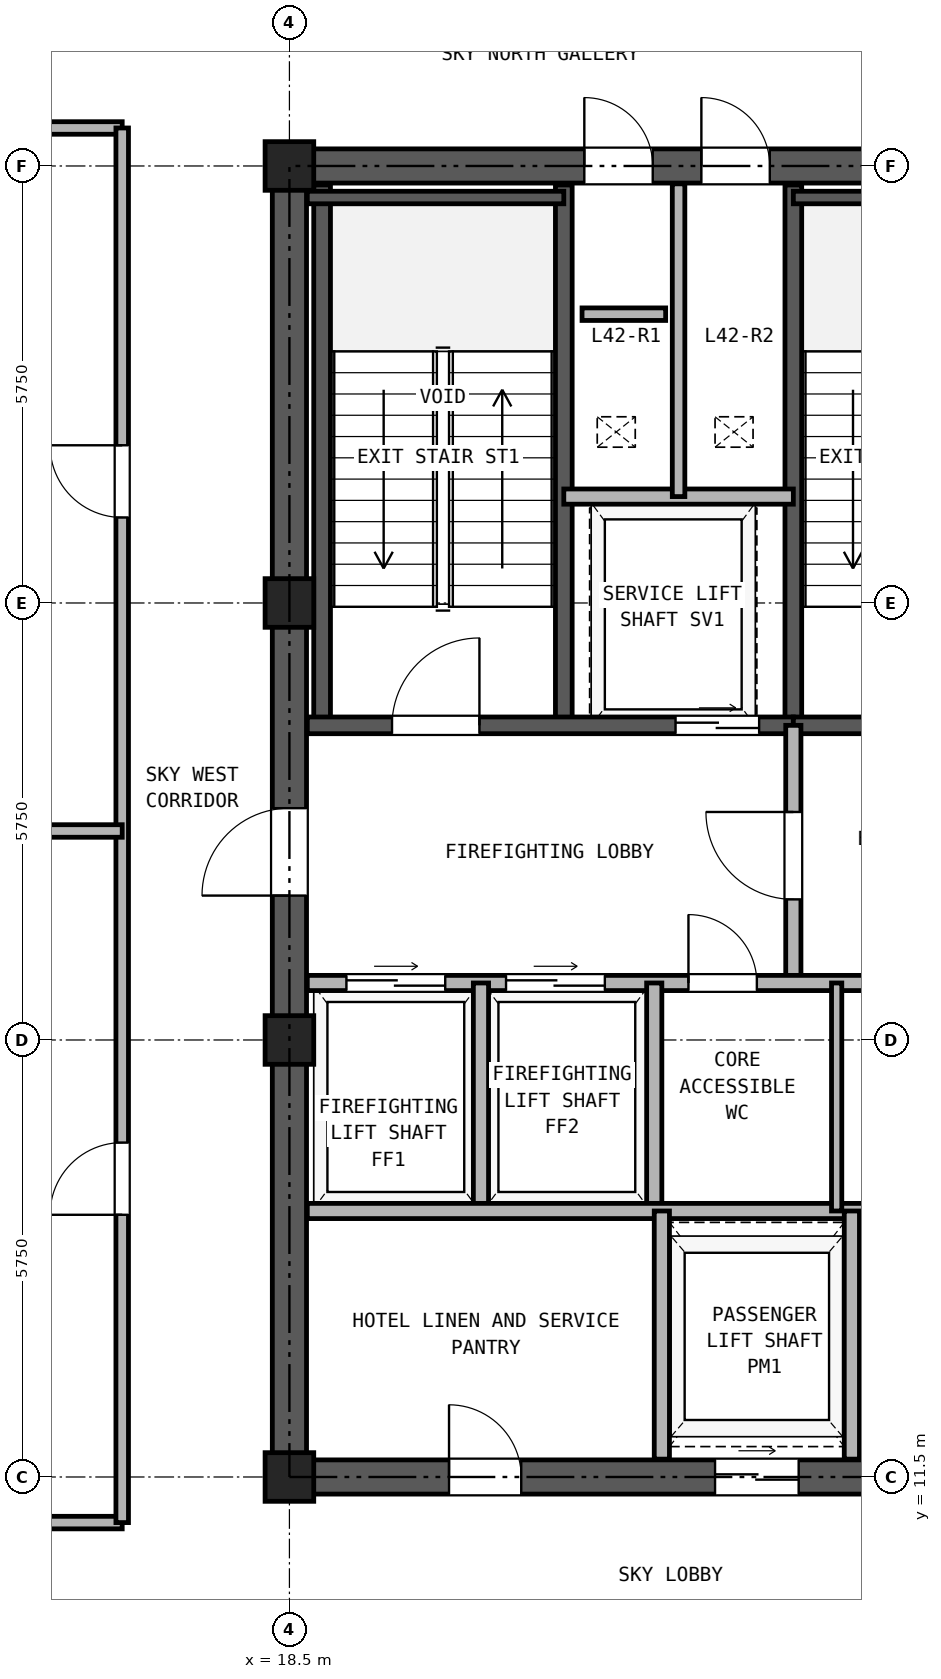
"""IFC4 building model, lengths in metres.
Left out: names, types, materials, properties, quantities, classifications, styles, units other than length and angle.
Written with IfcOpenShell. Run it as: python <this file> out.ifc"""

import sys

from ifc_helpers import new_model, si_unit, direction, frame, frame_2d, origin, origin_2d, place, context, subcontext, project, spatial, rectangle, hollow_rectangle, extrude, source, transform, mapped, element, fill, save


model = new_model("IFC4")
c1 = context("Model", 3, precision=1e-05, world=origin(), true_north=direction((0.0, 1.0)))
c2 = subcontext(c1, "Body", "Model", "MODEL_VIEW")
j1 = project(units=[si_unit("LENGTHUNIT", "METRE"), si_unit("PLANEANGLEUNIT", "RADIAN")], contexts=[c1])
p1 = place(None, origin())
s1 = spatial("IfcSite", under=j1, at=p1, CompositionType="ELEMENT")
p2 = place(p1, origin())
s2 = spatial("IfcBuilding", under=s1, at=p2, CompositionType="ELEMENT")
p3 = place(p2, frame((0.0, 0.0, 151.6)))
s3 = spatial("IfcBuildingStorey", under=s2, at=p3, CompositionType="ELEMENT", Elevation=151.6)
m1 = source(origin(), c2, "Body", "SweptSolid", [
    extrude(hollow_rectangle(XDim=0.64, YDim=0.64, WallThickness=0.035, at=origin_2d()), origin(), (0.0, 0.0, 1.0), 4.25),
])
for number, where, z_axis, x_axis in (
    (1, (18.5, 11.5, 0.0), (0.0, 0.0, 1.0), (1.0, 0.0, 0.0)),
    (2, (18.5, 17.25, 0.0), (0.0, 0.0, 1.0), (1.0, 0.0, 0.0)),
    (3, (18.5, 23.0, 0.0), (0.0, 0.0, 1.0), (1.0, 0.0, 0.0)),
    (4, (18.5, 28.75, 0.0), (0.0, 0.0, 1.0), (1.0, 0.0, 0.0)),
):
    element("IfcColumn", number, at=place(p3, frame(where, z_axis=z_axis, x_axis=x_axis)), inside=s3, PredefinedType="COLUMN", context=c2, shape_type="MappedRepresentation", body=[
        mapped(m1, transform((0.0, 0.0, 0.0), x_axis=(1.0, 0.0, 0.0), y_axis=(0.0, 1.0, 0.0), z_axis=(0.0, 0.0, 1.0), scale=1.0)),
    ])
p4 = place(p3, frame((18.275, 11.5, 0.0), z_axis=(0.0, 0.0, 1.0), x_axis=(1.0, 0.0, 0.0)))
e5 = element("IfcWall", 5, at=p4, inside=s3, PredefinedType="SHEAR", context=c2, shape_type="SweptSolid", body=[
    extrude(rectangle(XDim=10.45, YDim=0.45, at=frame_2d((5.225, 0.0))), origin(), (0.0, 0.0, 1.0), 4.25),
])
p5 = place(p4, frame((2.325, 0.0, 0.0)))
e6 = element("IfcOpeningElement", 6, at=p5, cuts=e5, PredefinedType="OPENING", context=c2, shape_type="SweptSolid", body=[
    extrude(rectangle(XDim=0.95, YDim=2.15, at=frame_2d((0.475, 1.075))), frame((0.0, 0.235, 0.0), z_axis=(0.0, -1.0, 0.0), x_axis=(1.0, 0.0, 0.0)), (0.0, 0.0, 1.0), 0.47),
])
p6 = place(p4, frame((5.825, 0.0, 0.0)))
e7 = element("IfcOpeningElement", 7, at=p6, cuts=e5, PredefinedType="OPENING", context=c2, shape_type="SweptSolid", body=[
    extrude(rectangle(XDim=1.1, YDim=2.25, at=frame_2d((0.55, 1.125))), frame((0.0, 0.235, 0.0), z_axis=(0.0, -1.0, 0.0), x_axis=(1.0, 0.0, 0.0)), (0.0, 0.0, 1.0), 0.47),
])
p7 = place(p4, frame((8.225, 0.0, 0.0)))
e8 = element("IfcOpeningElement", 8, at=p7, cuts=e5, PredefinedType="OPENING", context=c2, shape_type="SweptSolid", body=[
    extrude(rectangle(XDim=1.1, YDim=2.25, at=frame_2d((0.55, 1.125))), frame((0.0, 0.235, 0.0), z_axis=(0.0, -1.0, 0.0), x_axis=(1.0, 0.0, 0.0)), (0.0, 0.0, 1.0), 0.47),
])
p8 = place(p3, frame((18.275, 28.75, 0.0), z_axis=(0.0, 0.0, 1.0), x_axis=(1.0, 0.0, 0.0)))
e9 = element("IfcWall", 9, at=p8, inside=s3, PredefinedType="SHEAR", context=c2, shape_type="SweptSolid", body=[
    extrude(rectangle(XDim=10.45, YDim=0.45, at=frame_2d((5.225, 0.0))), origin(), (0.0, 0.0, 1.0), 4.25),
])
p9 = place(p8, frame((4.105, 0.0, 0.0)))
e10 = element("IfcOpeningElement", 10, at=p9, cuts=e9, PredefinedType="OPENING", context=c2, shape_type="SweptSolid", body=[
    extrude(rectangle(XDim=0.9, YDim=2.05, at=frame_2d((0.45, 1.025))), frame((0.0, 0.235, 0.0), z_axis=(0.0, -1.0, 0.0), x_axis=(1.0, 0.0, 0.0)), (0.0, 0.0, 1.0), 0.47),
])
p10 = place(p8, frame((5.645, 0.0, 0.0)))
e11 = element("IfcOpeningElement", 11, at=p10, cuts=e9, PredefinedType="OPENING", context=c2, shape_type="SweptSolid", body=[
    extrude(rectangle(XDim=0.9, YDim=2.05, at=frame_2d((0.45, 1.025))), frame((0.0, 0.235, 0.0), z_axis=(0.0, -1.0, 0.0), x_axis=(1.0, 0.0, 0.0)), (0.0, 0.0, 1.0), 0.47),
])
p11 = place(p3, frame((18.5, 11.725, 0.0), z_axis=(0.0, 0.0, 1.0), x_axis=(0.0, 1.0, 0.0)))
e12 = element("IfcWall", 12, at=p11, inside=s3, PredefinedType="SHEAR", context=c2, shape_type="SweptSolid", body=[
    extrude(rectangle(XDim=16.8, YDim=0.45, at=frame_2d((8.4, 0.0))), origin(), (0.0, 0.0, 1.0), 4.25),
])
p12 = place(p11, frame((7.425, 0.0, 0.0)))
e13 = element("IfcOpeningElement", 13, at=p12, cuts=e12, PredefinedType="OPENING", context=c2, shape_type="SweptSolid", body=[
    extrude(rectangle(XDim=1.15, YDim=2.2, at=frame_2d((0.575, 1.1))), frame((0.0, 0.235, 0.0), z_axis=(0.0, -1.0, 0.0), x_axis=(1.0, 0.0, 0.0)), (0.0, 0.0, 1.0), 0.47),
])
for number, where, z_axis, x_axis in (
    (14, (18.93, 21.39, 0.0), (0.0, 0.0, 1.0), (0.0, 1.0, 0.0)),
    (15, (22.11, 21.39, 0.0), (0.0, 0.0, 1.0), (0.0, 1.0, 0.0)),
    (16, (25.13, 21.39, 0.0), (0.0, 0.0, 1.0), (0.0, 1.0, 0.0)),
):
    element("IfcWall", number, at=place(p3, frame(where, z_axis=z_axis, x_axis=x_axis)), inside=s3, PredefinedType="SOLIDWALL", context=c2, shape_type="SweptSolid", body=[
        extrude(rectangle(XDim=7.11, YDim=0.22, at=frame_2d((3.555, 0.0))), origin(), (0.0, 0.0, 1.0), 4.25),
    ])
p13 = place(p3, frame((18.735, 28.335, 0.0), z_axis=(0.0, 0.0, 1.0), x_axis=(1.0, 0.0, 0.0)))
e17 = element("IfcWall", 17, at=p13, inside=s3, PredefinedType="PARTITIONING", context=c2, shape_type="SweptSolid", body=[
    extrude(rectangle(XDim=3.375, YDim=0.165, at=frame_2d((1.688, 0.0))), origin(), (0.0, 0.0, 1.0), 4.25),
])
p14 = place(p3, frame((25.13, 28.335, 0.0), z_axis=(0.0, 0.0, 1.0), x_axis=(1.0, 0.0, 0.0)))
e18 = element("IfcWall", 18, at=p14, inside=s3, PredefinedType="PARTITIONING", context=c2, shape_type="SweptSolid", body=[
    extrude(rectangle(XDim=3.135, YDim=0.165, at=frame_2d((1.567, 0.0))), origin(), (0.0, 0.0, 1.0), 4.25),
])
p15 = place(p3, frame((18.735, 21.39, 0.0), z_axis=(0.0, 0.0, 1.0), x_axis=(1.0, 0.0, 0.0)))
e19 = element("IfcWall", 19, at=p15, inside=s3, PredefinedType="SOLIDWALL", context=c2, shape_type="SweptSolid", body=[
    extrude(rectangle(XDim=6.395, YDim=0.22, at=frame_2d((3.197, 0.0))), origin(), (0.0, 0.0, 1.0), 4.25),
])
p16 = place(p15, frame((1.115, 0.0, 0.0)))
e20 = element("IfcOpeningElement", 20, at=p16, cuts=e19, PredefinedType="OPENING", context=c2, shape_type="SweptSolid", body=[
    extrude(rectangle(XDim=1.15, YDim=2.2, at=frame_2d((0.575, 1.1))), frame((0.0, 0.12, 0.0), z_axis=(0.0, -1.0, 0.0), x_axis=(1.0, 0.0, 0.0)), (0.0, 0.0, 1.0), 0.24),
])
p17 = place(p15, frame((4.845, 0.0, 0.0)))
e21 = element("IfcOpeningElement", 21, at=p17, cuts=e19, PredefinedType="OPENING", context=c2, shape_type="SweptSolid", body=[
    extrude(rectangle(XDim=1.1, YDim=2.25, at=frame_2d((0.55, 1.125))), frame((0.0, 0.12, 0.0), z_axis=(0.0, -1.0, 0.0), x_axis=(1.0, 0.0, 0.0)), (0.0, 0.0, 1.0), 0.24),
])
p18 = place(p3, frame((25.13, 21.39, 0.0), z_axis=(0.0, 0.0, 1.0), x_axis=(1.0, 0.0, 0.0)))
e22 = element("IfcWall", 22, at=p18, inside=s3, PredefinedType="SOLIDWALL", context=c2, shape_type="SweptSolid", body=[
    extrude(rectangle(XDim=3.135, YDim=0.22, at=frame_2d((1.567, 0.0))), origin(), (0.0, 0.0, 1.0), 4.25),
])
p19 = place(p18, frame((0.92, 0.0, 0.0)))
e23 = element("IfcOpeningElement", 23, at=p19, cuts=e22, PredefinedType="OPENING", context=c2, shape_type="SweptSolid", body=[
    extrude(rectangle(XDim=1.15, YDim=2.2, at=frame_2d((0.575, 1.1))), frame((0.0, 0.12, 0.0), z_axis=(0.0, -1.0, 0.0), x_axis=(1.0, 0.0, 0.0)), (0.0, 0.0, 1.0), 0.24),
])
p20 = place(p3, frame((22.11, 24.4, 0.0), z_axis=(0.0, 0.0, 1.0), x_axis=(1.0, 0.0, 0.0)))
e24 = element("IfcWall", 24, at=p20, inside=s3, PredefinedType="PARTITIONING", context=c2, shape_type="SweptSolid", body=[
    extrude(rectangle(XDim=3.02, YDim=0.2, at=frame_2d((1.51, 0.0))), origin(), (0.0, 0.0, 1.0), 4.25),
])
p21 = place(p3, frame((23.62, 24.4, 0.0), z_axis=(0.0, 0.0, 1.0), x_axis=(0.0, 1.0, 0.0)))
e25 = element("IfcWall", 25, at=p21, inside=s3, PredefinedType="PARTITIONING", context=c2, shape_type="SweptSolid", body=[
    extrude(rectangle(XDim=4.115, YDim=0.165, at=frame_2d((2.058, 0.0))), origin(), (0.0, 0.0, 1.0), 4.25),
])
p22 = place(p3, frame((25.13, 18.0, 0.0), z_axis=(0.0, 0.0, 1.0), x_axis=(0.0, 1.0, 0.0)))
e26 = element("IfcWall", 26, at=p22, inside=s3, PredefinedType="PARTITIONING", context=c2, shape_type="SweptSolid", body=[
    extrude(rectangle(XDim=3.39, YDim=0.2, at=frame_2d((1.695, 0.0))), origin(), (0.0, 0.0, 1.0), 4.25),
])
p23 = place(p22, frame((1.1, 0.0, 0.0)))
e27 = element("IfcOpeningElement", 27, at=p23, cuts=e26, PredefinedType="OPENING", context=c2, shape_type="SweptSolid", body=[
    extrude(rectangle(XDim=1.15, YDim=2.2, at=frame_2d((0.575, 1.1))), frame((0.0, 0.11, 0.0), z_axis=(0.0, -1.0, 0.0), x_axis=(1.0, 0.0, 0.0)), (0.0, 0.0, 1.0), 0.22),
])
p24 = place(p3, frame((18.735, 18.0, 0.0), z_axis=(0.0, 0.0, 1.0), x_axis=(1.0, 0.0, 0.0)))
e28 = element("IfcWall", 28, at=p24, inside=s3, PredefinedType="PARTITIONING", context=c2, shape_type="SweptSolid", body=[
    extrude(rectangle(XDim=9.53, YDim=0.2, at=frame_2d((4.765, 0.0))), origin(), (0.0, 0.0, 1.0), 4.25),
])
p25 = place(p24, frame((0.515, 0.0, 0.0)))
e29 = element("IfcOpeningElement", 29, at=p25, cuts=e28, PredefinedType="OPENING", context=c2, shape_type="SweptSolid", body=[
    extrude(rectangle(XDim=1.3, YDim=2.3, at=frame_2d((0.65, 1.15))), frame((0.0, 0.11, 0.0), z_axis=(0.0, -1.0, 0.0), x_axis=(1.0, 0.0, 0.0)), (0.0, 0.0, 1.0), 0.22),
])
p26 = place(p24, frame((2.615, 0.0, 0.0)))
e30 = element("IfcOpeningElement", 30, at=p26, cuts=e28, PredefinedType="OPENING", context=c2, shape_type="SweptSolid", body=[
    extrude(rectangle(XDim=1.3, YDim=2.3, at=frame_2d((0.65, 1.15))), frame((0.0, 0.11, 0.0), z_axis=(0.0, -1.0, 0.0), x_axis=(1.0, 0.0, 0.0)), (0.0, 0.0, 1.0), 0.22),
])
p27 = place(p24, frame((5.015, 0.0, 0.0)))
e31 = element("IfcOpeningElement", 31, at=p27, cuts=e28, PredefinedType="OPENING", context=c2, shape_type="SweptSolid", body=[
    extrude(rectangle(XDim=0.9, YDim=2.05, at=frame_2d((0.45, 1.025))), frame((0.0, 0.11, 0.0), z_axis=(0.0, -1.0, 0.0), x_axis=(1.0, 0.0, 0.0)), (0.0, 0.0, 1.0), 0.22),
])
p28 = place(p24, frame((7.715, 0.0, 0.0)))
e32 = element("IfcOpeningElement", 32, at=p28, cuts=e28, PredefinedType="OPENING", context=c2, shape_type="SweptSolid", body=[
    extrude(rectangle(XDim=0.9, YDim=2.05, at=frame_2d((0.45, 1.025))), frame((0.0, 0.11, 0.0), z_axis=(0.0, -1.0, 0.0), x_axis=(1.0, 0.0, 0.0)), (0.0, 0.0, 1.0), 0.22),
])
for number, where, z_axis, x_axis in (
    (33, (21.02, 15.0, 0.0), (0.0, 0.0, 1.0), (0.0, 1.0, 0.0)),
    (34, (23.3, 15.0, 0.0), (0.0, 0.0, 1.0), (0.0, 1.0, 0.0)),
):
    element("IfcWall", number, at=place(p3, frame(where, z_axis=z_axis, x_axis=x_axis)), inside=s3, PredefinedType="PARTITIONING", context=c2, shape_type="SweptSolid", body=[
        extrude(rectangle(XDim=3.0, YDim=0.2, at=frame_2d((1.5, 0.0))), origin(), (0.0, 0.0, 1.0), 4.25),
    ])
p29 = place(p3, frame((18.735, 15.0, 0.0), z_axis=(0.0, 0.0, 1.0), x_axis=(1.0, 0.0, 0.0)))
e35 = element("IfcWall", 35, at=p29, inside=s3, PredefinedType="PARTITIONING", context=c2, shape_type="SweptSolid", body=[
    extrude(rectangle(XDim=9.53, YDim=0.2, at=frame_2d((4.765, 0.0))), origin(), (0.0, 0.0, 1.0), 4.25),
])
p30 = place(p3, frame((25.7, 15.0, 0.0), z_axis=(0.0, 0.0, 1.0), x_axis=(0.0, 1.0, 0.0)))
e36 = element("IfcWall", 36, at=p30, inside=s3, PredefinedType="PARTITIONING", context=c2, shape_type="SweptSolid", body=[
    extrude(rectangle(XDim=3.0, YDim=0.135, at=frame_2d((1.5, 0.0))), origin(), (0.0, 0.0, 1.0), 4.25),
])
for number, where, z_axis, x_axis in (
    (37, (23.4, 11.735, 0.0), (0.0, 0.0, 1.0), (0.0, 1.0, 0.0)),
    (38, (25.9, 11.735, 0.0), (0.0, 0.0, 1.0), (0.0, 1.0, 0.0)),
):
    element("IfcWall", number, at=place(p3, frame(where, z_axis=z_axis, x_axis=x_axis)), inside=s3, PredefinedType="PARTITIONING", context=c2, shape_type="SweptSolid", body=[
        extrude(rectangle(XDim=3.265, YDim=0.2, at=frame_2d((1.632, 0.0))), origin(), (0.0, 0.0, 1.0), 4.25),
    ])
for number, where, z_axis, x_axis in (
    (39, (8.0, 10.9, 0.0), (0.0, 0.0, 1.0), (1.0, 0.0, 0.0)),
    (40, (8.0, 29.25, 0.0), (0.0, 0.0, 1.0), (1.0, 0.0, 0.0)),
):
    element("IfcWall", number, at=place(p3, frame(where, z_axis=z_axis, x_axis=x_axis)), inside=s3, PredefinedType="PARTITIONING", context=c2, shape_type="SweptSolid", body=[
        extrude(rectangle(XDim=8.3, YDim=0.165, at=frame_2d((4.15, 0.0))), origin(), (0.0, 0.0, 1.0), 4.25),
    ])
p31 = place(p3, frame((16.3, 10.9, 0.0), z_axis=(0.0, 0.0, 1.0), x_axis=(0.0, 1.0, 0.0)))
e41 = element("IfcWall", 41, at=p31, inside=s3, PredefinedType="PARTITIONING", context=c2, shape_type="SweptSolid", body=[
    extrude(rectangle(XDim=18.35, YDim=0.165, at=frame_2d((9.175, 0.0))), origin(), (0.0, 0.0, 1.0), 4.25),
])
p32 = place(p31, frame((4.05, 0.0, 0.0)))
e42 = element("IfcOpeningElement", 42, at=p32, cuts=e41, PredefinedType="OPENING", context=c2, shape_type="SweptSolid", body=[
    extrude(rectangle(XDim=0.95, YDim=2.15, at=frame_2d((0.475, 1.075))), frame((0.0, 0.093, 0.0), z_axis=(0.0, -1.0, 0.0), x_axis=(1.0, 0.0, 0.0)), (0.0, 0.0, 1.0), 0.185),
])
p33 = place(p31, frame((13.225, 0.0, 0.0)))
e43 = element("IfcOpeningElement", 43, at=p33, cuts=e41, PredefinedType="OPENING", context=c2, shape_type="SweptSolid", body=[
    extrude(rectangle(XDim=0.95, YDim=2.15, at=frame_2d((0.475, 1.075))), frame((0.0, 0.093, 0.0), z_axis=(0.0, -1.0, 0.0), x_axis=(1.0, 0.0, 0.0)), (0.0, 0.0, 1.0), 0.185),
])
p34 = place(p3, frame((0.16, 20.0, 0.0), z_axis=(0.0, 0.0, 1.0), x_axis=(1.0, 0.0, 0.0)))
e44 = element("IfcWall", 44, at=p34, inside=s3, PredefinedType="PARTITIONING", context=c2, shape_type="SweptSolid", body=[
    extrude(rectangle(XDim=16.14, YDim=0.165, at=frame_2d((8.07, 0.0))), origin(), (0.0, 0.0, 1.0), 3.883),
])
p35 = place(p3, frame((22.35, 26.8, 0.0), z_axis=(0.0, 0.0, 1.0), x_axis=(1.0, 0.0, 0.0)))
e45 = element("IfcWall", 45, at=p35, inside=s3, PredefinedType="PARTITIONING", context=c2, shape_type="SweptSolid", body=[
    extrude(rectangle(XDim=1.1, YDim=0.165, at=frame_2d((0.55, 0.0))), origin(), (0.0, 0.0, 1.0), 4.25),
])
p36 = place(p16, frame((1.15, 0.0, 0.0), z_axis=(0.0, 0.0, 1.0), x_axis=(-1.0, 0.0, 0.0)))
e46 = element("IfcDoor", 46, at=p36, inside=s3, OperationType="SINGLE_SWING_RIGHT", PredefinedType="DOOR", context=c2, shape_type="SweptSolid", body=[
    extrude(rectangle(XDim=1.15, YDim=2.2, at=frame_2d((0.575, 1.1))), frame((0.0, 0.025, 0.0), z_axis=(0.0, -1.0, 0.0), x_axis=(1.0, 0.0, 0.0)), (0.0, 0.0, 1.0), 0.05),
])
fill(e20, e46)
p37 = place(p17, frame((1.1, 0.0, 0.0), z_axis=(0.0, 0.0, 1.0), x_axis=(-1.0, 0.0, 0.0)))
e47 = element("IfcDoor", 47, at=p37, inside=s3, OperationType="DOUBLE_DOOR_SLIDING", PredefinedType="DOOR", context=c2, shape_type="SweptSolid", body=[
    extrude(rectangle(XDim=1.1, YDim=2.25, at=frame_2d((0.55, 1.125))), frame((0.0, 0.025, 0.0), z_axis=(0.0, -1.0, 0.0), x_axis=(1.0, 0.0, 0.0)), (0.0, 0.0, 1.0), 0.05),
])
fill(e21, e47)
p38 = place(p23, origin())
e48 = element("IfcDoor", 48, at=p38, inside=s3, OperationType="SINGLE_SWING_RIGHT", PredefinedType="DOOR", context=c2, shape_type="SweptSolid", body=[
    extrude(rectangle(XDim=1.15, YDim=2.2, at=frame_2d((0.575, 1.1))), frame((0.0, 0.025, 0.0), z_axis=(0.0, -1.0, 0.0), x_axis=(1.0, 0.0, 0.0)), (0.0, 0.0, 1.0), 0.05),
])
fill(e27, e48)
p39 = place(p25, origin())
e49 = element("IfcDoor", 49, at=p39, inside=s3, OperationType="DOUBLE_DOOR_SLIDING", PredefinedType="DOOR", context=c2, shape_type="SweptSolid", body=[
    extrude(rectangle(XDim=1.3, YDim=2.3, at=frame_2d((0.65, 1.15))), frame((0.0, 0.025, 0.0), z_axis=(0.0, -1.0, 0.0), x_axis=(1.0, 0.0, 0.0)), (0.0, 0.0, 1.0), 0.05),
])
fill(e29, e49)
p40 = place(p26, origin())
e50 = element("IfcDoor", 50, at=p40, inside=s3, OperationType="DOUBLE_DOOR_SLIDING", PredefinedType="DOOR", context=c2, shape_type="SweptSolid", body=[
    extrude(rectangle(XDim=1.3, YDim=2.3, at=frame_2d((0.65, 1.15))), frame((0.0, 0.025, 0.0), z_axis=(0.0, -1.0, 0.0), x_axis=(1.0, 0.0, 0.0)), (0.0, 0.0, 1.0), 0.05),
])
fill(e30, e50)
p41 = place(p27, frame((0.9, 0.0, 0.0), z_axis=(0.0, 0.0, 1.0), x_axis=(-1.0, 0.0, 0.0)))
e51 = element("IfcDoor", 51, at=p41, inside=s3, OperationType="SINGLE_SWING_LEFT", PredefinedType="DOOR", context=c2, shape_type="SweptSolid", body=[
    extrude(rectangle(XDim=0.9, YDim=2.05, at=frame_2d((0.45, 1.025))), frame((0.0, 0.025, 0.0), z_axis=(0.0, -1.0, 0.0), x_axis=(1.0, 0.0, 0.0)), (0.0, 0.0, 1.0), 0.05),
])
fill(e31, e51)
p42 = place(p12, frame((1.15, 0.0, 0.0), z_axis=(0.0, 0.0, 1.0), x_axis=(-1.0, 0.0, 0.0)))
e52 = element("IfcDoor", 52, at=p42, inside=s3, OperationType="SINGLE_SWING_LEFT", PredefinedType="DOOR", context=c2, shape_type="SweptSolid", body=[
    extrude(rectangle(XDim=1.15, YDim=2.2, at=frame_2d((0.575, 1.1))), frame((0.0, 0.025, 0.0), z_axis=(0.0, -1.0, 0.0), x_axis=(1.0, 0.0, 0.0)), (0.0, 0.0, 1.0), 0.05),
])
fill(e13, e52)
p43 = place(p9, origin())
e53 = element("IfcDoor", 53, at=p43, inside=s3, OperationType="SINGLE_SWING_LEFT", PredefinedType="DOOR", context=c2, shape_type="SweptSolid", body=[
    extrude(rectangle(XDim=0.9, YDim=2.05, at=frame_2d((0.45, 1.025))), frame((0.0, 0.025, 0.0), z_axis=(0.0, -1.0, 0.0), x_axis=(1.0, 0.0, 0.0)), (0.0, 0.0, 1.0), 0.05),
])
fill(e10, e53)
p44 = place(p10, origin())
e54 = element("IfcDoor", 54, at=p44, inside=s3, OperationType="SINGLE_SWING_LEFT", PredefinedType="DOOR", context=c2, shape_type="SweptSolid", body=[
    extrude(rectangle(XDim=0.9, YDim=2.05, at=frame_2d((0.45, 1.025))), frame((0.0, 0.025, 0.0), z_axis=(0.0, -1.0, 0.0), x_axis=(1.0, 0.0, 0.0)), (0.0, 0.0, 1.0), 0.05),
])
fill(e11, e54)
p45 = place(p5, frame((0.95, 0.0, 0.0), z_axis=(0.0, 0.0, 1.0), x_axis=(-1.0, 0.0, 0.0)))
e55 = element("IfcDoor", 55, at=p45, inside=s3, OperationType="SINGLE_SWING_LEFT", PredefinedType="DOOR", context=c2, shape_type="SweptSolid", body=[
    extrude(rectangle(XDim=0.95, YDim=2.15, at=frame_2d((0.475, 1.075))), frame((0.0, 0.025, 0.0), z_axis=(0.0, -1.0, 0.0), x_axis=(1.0, 0.0, 0.0)), (0.0, 0.0, 1.0), 0.05),
])
fill(e6, e55)
p46 = place(p6, frame((1.1, 0.0, 0.0), z_axis=(0.0, 0.0, 1.0), x_axis=(-1.0, 0.0, 0.0)))
e56 = element("IfcDoor", 56, at=p46, inside=s3, OperationType="DOUBLE_DOOR_SLIDING", PredefinedType="DOOR", context=c2, shape_type="SweptSolid", body=[
    extrude(rectangle(XDim=1.1, YDim=2.25, at=frame_2d((0.55, 1.125))), frame((0.0, 0.025, 0.0), z_axis=(0.0, -1.0, 0.0), x_axis=(1.0, 0.0, 0.0)), (0.0, 0.0, 1.0), 0.05),
])
fill(e7, e56)
p47 = place(p32, frame((0.95, 0.0, 0.0), z_axis=(0.0, 0.0, 1.0), x_axis=(-1.0, 0.0, 0.0)))
e57 = element("IfcDoor", 57, at=p47, inside=s3, OperationType="SINGLE_SWING_LEFT", PredefinedType="DOOR", context=c2, shape_type="SweptSolid", body=[
    extrude(rectangle(XDim=0.95, YDim=2.15, at=frame_2d((0.475, 1.075))), frame((0.0, 0.025, 0.0), z_axis=(0.0, -1.0, 0.0), x_axis=(1.0, 0.0, 0.0)), (0.0, 0.0, 1.0), 0.05),
])
fill(e42, e57)
p48 = place(p33, frame((0.95, 0.0, 0.0), z_axis=(0.0, 0.0, 1.0), x_axis=(-1.0, 0.0, 0.0)))
e58 = element("IfcDoor", 58, at=p48, inside=s3, OperationType="SINGLE_SWING_RIGHT", PredefinedType="DOOR", context=c2, shape_type="SweptSolid", body=[
    extrude(rectangle(XDim=0.95, YDim=2.15, at=frame_2d((0.475, 1.075))), frame((0.0, 0.025, 0.0), z_axis=(0.0, -1.0, 0.0), x_axis=(1.0, 0.0, 0.0)), (0.0, 0.0, 1.0), 0.05),
])
fill(e43, e58)
save(model, sys.argv[1])
